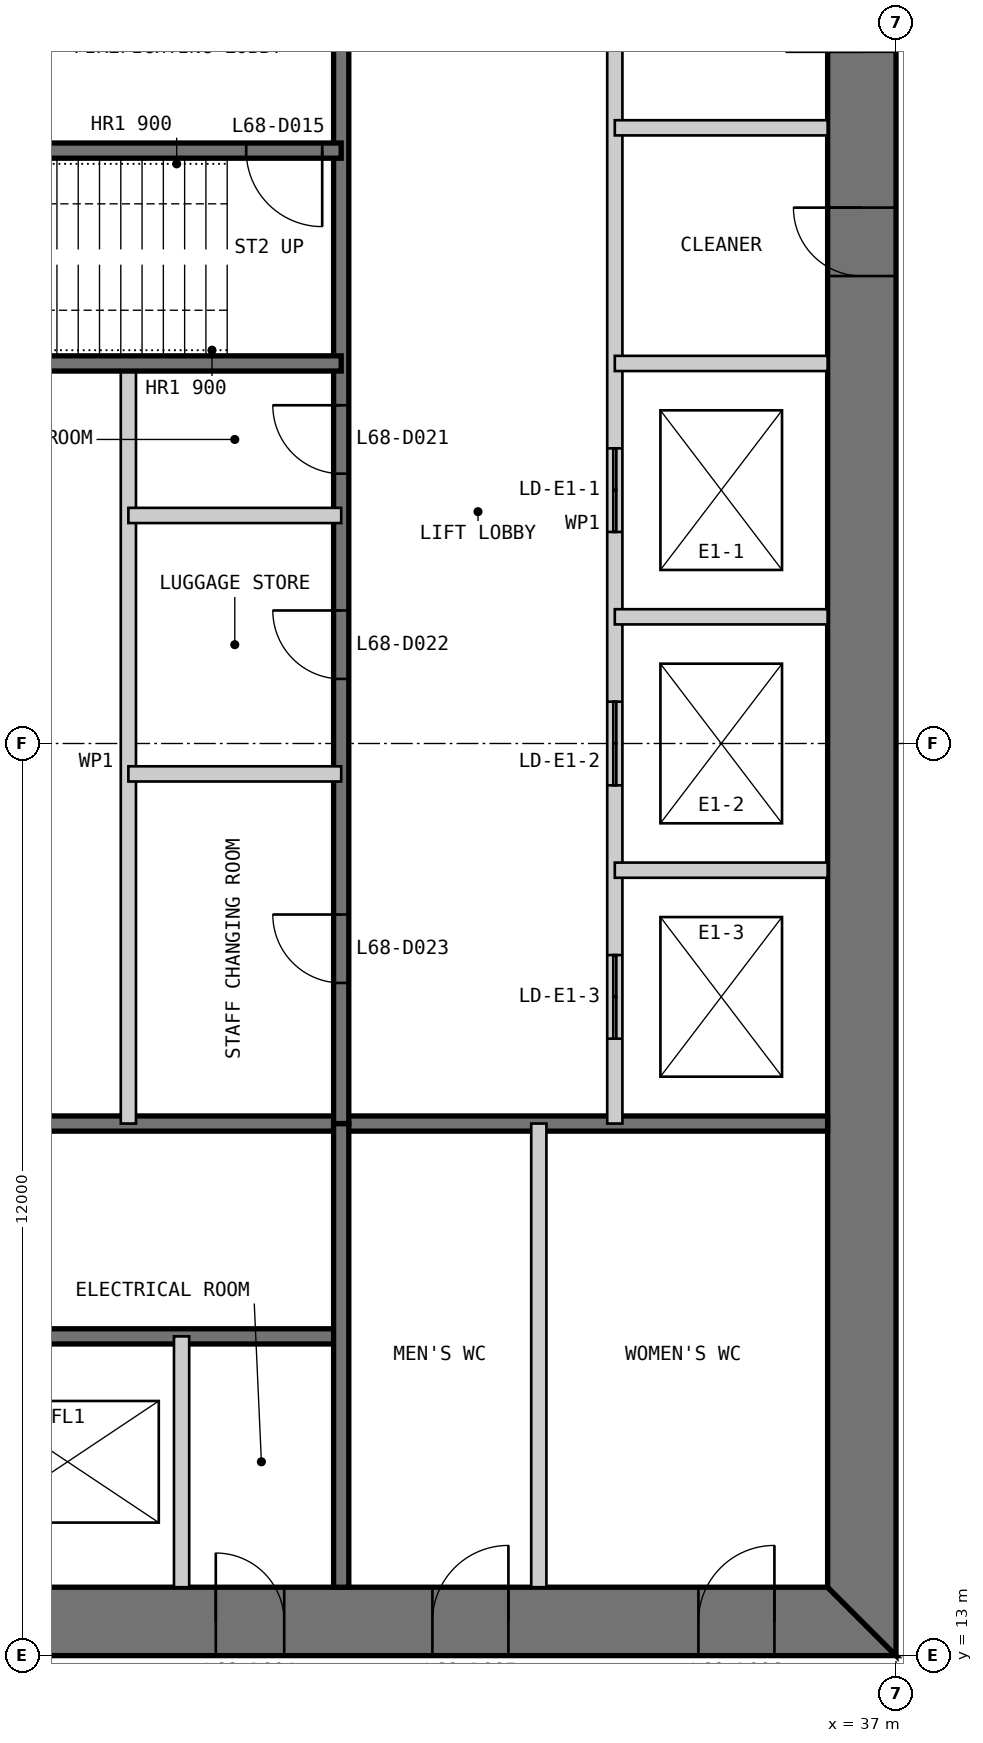
"""IFC4 building model, lengths in metres.
Left out: names, types, materials, properties, quantities, classifications, styles, units other than length and angle.
Written with IfcOpenShell. Run it as: python <this file> out.ifc"""

import sys

from ifc_helpers import new_model, si_unit, direction, frame, frame_2d, origin, place, context, subcontext, project, spatial, polyline, rectangle, outline, extrude, element, fill, save


model = new_model("IFC4")
c1 = context("Model", 3, precision=1e-05, world=origin(), true_north=direction((0.0, 1.0)))
c2 = subcontext(c1, "Body", "Model", "MODEL_VIEW")
j1 = project(units=[si_unit("LENGTHUNIT", "METRE"), si_unit("PLANEANGLEUNIT", "RADIAN")], contexts=[c1])
p1 = place(None, origin())
s1 = spatial("IfcSite", under=j1, at=p1, CompositionType="ELEMENT")
p2 = place(p1, origin())
s2 = spatial("IfcBuilding", under=s1, at=p2, CompositionType="ELEMENT")
p3 = place(p2, frame((0.0, 0.0, 283.2)))
s3 = spatial("IfcBuildingStorey", under=s2, at=p3, CompositionType="ELEMENT", Elevation=283.2)
p4 = place(p3, frame((13.0, 13.45, 0.0), z_axis=(0.0, 0.0, 1.0), x_axis=(1.0, 0.0, 0.0)))
e1 = element("IfcWall", 1, at=p4, inside=s3, PredefinedType="SHEAR", context=c2, shape_type="SweptSolid", body=[
    extrude(outline(polyline([(0.0, -0.45), (24.0, -0.45), (23.1, 0.45), (0.9, 0.45), (0.0, -0.45)])), origin(), (0.0, 0.0, 1.0), 3.4),
])
p5 = place(p4, frame((4.9, 0.0, 0.0)))
e2 = element("IfcOpeningElement", 2, at=p5, cuts=e1, PredefinedType="OPENING", context=c2, shape_type="SweptSolid", body=[
    extrude(rectangle(XDim=1.0, YDim=2.2, at=frame_2d((0.5, 1.1))), frame((0.0, 0.46, 0.0), z_axis=(0.0, -1.0, 0.0), x_axis=(1.0, 0.0, 0.0)), (0.0, 0.0, 1.0), 0.92),
])
p6 = place(p4, frame((8.9, 0.0, 0.0)))
e3 = element("IfcOpeningElement", 3, at=p6, cuts=e1, PredefinedType="OPENING", context=c2, shape_type="SweptSolid", body=[
    extrude(rectangle(XDim=1.1, YDim=2.2, at=frame_2d((0.55, 1.1))), frame((0.0, 0.46, 0.0), z_axis=(0.0, -1.0, 0.0), x_axis=(1.0, 0.0, 0.0)), (0.0, 0.0, 1.0), 0.92),
])
p7 = place(p4, frame((15.05, 0.0, 0.0)))
e4 = element("IfcOpeningElement", 4, at=p7, cuts=e1, PredefinedType="OPENING", context=c2, shape_type="SweptSolid", body=[
    extrude(rectangle(XDim=0.9, YDim=2.2, at=frame_2d((0.45, 1.1))), frame((0.0, 0.46, 0.0), z_axis=(0.0, -1.0, 0.0), x_axis=(1.0, 0.0, 0.0)), (0.0, 0.0, 1.0), 0.92),
])
p8 = place(p4, frame((17.9, 0.0, 0.0)))
e5 = element("IfcOpeningElement", 5, at=p8, cuts=e1, PredefinedType="OPENING", context=c2, shape_type="SweptSolid", body=[
    extrude(rectangle(XDim=1.0, YDim=2.2, at=frame_2d((0.5, 1.1))), frame((0.0, 0.46, 0.0), z_axis=(0.0, -1.0, 0.0), x_axis=(1.0, 0.0, 0.0)), (0.0, 0.0, 1.0), 0.92),
])
p9 = place(p4, frame((21.4, 0.0, 0.0)))
e6 = element("IfcOpeningElement", 6, at=p9, cuts=e1, PredefinedType="OPENING", context=c2, shape_type="SweptSolid", body=[
    extrude(rectangle(XDim=1.0, YDim=2.2, at=frame_2d((0.5, 1.1))), frame((0.0, 0.46, 0.0), z_axis=(0.0, -1.0, 0.0), x_axis=(1.0, 0.0, 0.0)), (0.0, 0.0, 1.0), 0.92),
])
p10 = place(p3, frame((36.55, 13.9, 0.0), z_axis=(0.0, 0.0, 1.0), x_axis=(0.0, 1.0, 0.0)))
e7 = element("IfcWall", 7, at=p10, inside=s3, PredefinedType="SHEAR", context=c2, shape_type="SweptSolid", body=[
    extrude(outline(polyline([(-0.9, -0.45), (23.1, -0.45), (22.2, 0.45), (0.0, 0.45), (-0.9, -0.45)])), origin(), (0.0, 0.0, 1.0), 3.4),
])
p11 = place(p10, frame((20.2, 0.0, 0.0)))
e8 = element("IfcOpeningElement", 8, at=p11, cuts=e7, PredefinedType="OPENING", context=c2, shape_type="SweptSolid", body=[
    extrude(rectangle(XDim=1.0, YDim=2.2, at=frame_2d((0.5, 1.1))), frame((0.0, 0.46, 0.0), z_axis=(0.0, -1.0, 0.0), x_axis=(1.0, 0.0, 0.0)), (0.0, 0.0, 1.0), 0.92),
])
p12 = place(p10, frame((17.25, 0.0, 0.0)))
e9 = element("IfcOpeningElement", 9, at=p12, cuts=e7, PredefinedType="OPENING", context=c2, shape_type="SweptSolid", body=[
    extrude(rectangle(XDim=0.9, YDim=2.2, at=frame_2d((0.45, 1.1))), frame((0.0, 0.46, 0.0), z_axis=(0.0, -1.0, 0.0), x_axis=(1.0, 0.0, 0.0)), (0.0, 0.0, 1.0), 0.92),
])
p13 = place(p3, frame((20.3, 17.2, 0.0), z_axis=(0.0, 0.0, 1.0), x_axis=(1.0, 0.0, 0.0)))
e10 = element("IfcWall", 10, at=p13, inside=s3, PredefinedType="SOLIDWALL", context=c2, shape_type="SweptSolid", body=[
    extrude(rectangle(XDim=9.4, YDim=0.2, at=frame_2d((4.7, 0.0))), origin(), (0.0, 0.0, 1.0), 3.2),
])
p14 = place(p13, frame((0.25, 0.0, 0.0)))
e11 = element("IfcOpeningElement", 11, at=p14, cuts=e10, PredefinedType="OPENING", context=c2, shape_type="SweptSolid", body=[
    extrude(rectangle(XDim=1.0, YDim=2.2, at=frame_2d((0.5, 1.1))), frame((0.0, 0.11, 0.0), z_axis=(0.0, -1.0, 0.0), x_axis=(1.0, 0.0, 0.0)), (0.0, 0.0, 1.0), 0.22),
])
p15 = place(p3, frame((20.3, 20.0, 0.0), z_axis=(0.0, 0.0, 1.0), x_axis=(1.0, 0.0, 0.0)))
e12 = element("IfcWall", 12, at=p15, inside=s3, PredefinedType="SOLIDWALL", context=c2, shape_type="SweptSolid", body=[
    extrude(rectangle(XDim=15.8, YDim=0.2, at=frame_2d((7.9, 0.0))), origin(), (0.0, 0.0, 1.0), 3.2),
])
p16 = place(p3, frame((27.6, 13.9, 0.0), z_axis=(0.0, 0.0, 1.0), x_axis=(0.0, 1.0, 0.0)))
e13 = element("IfcWall", 13, at=p16, inside=s3, PredefinedType="PARTITIONING", context=c2, shape_type="SweptSolid", body=[
    extrude(rectangle(XDim=3.3, YDim=0.2, at=frame_2d((1.65, 0.0))), origin(), (0.0, 0.0, 1.0), 3.2),
])
p17 = place(p3, frame((29.7, 13.9, 0.0), z_axis=(0.0, 0.0, 1.0), x_axis=(0.0, 1.0, 0.0)))
e14 = element("IfcWall", 14, at=p17, inside=s3, PredefinedType="SOLIDWALL", context=c2, shape_type="SweptSolid", body=[
    extrude(rectangle(XDim=6.1, YDim=0.2, at=frame_2d((3.05, 0.0))), origin(), (0.0, 0.0, 1.0), 3.2),
])
p18 = place(p3, frame((32.3, 13.9, 0.0), z_axis=(0.0, 0.0, 1.0), x_axis=(0.0, 1.0, 0.0)))
e15 = element("IfcWall", 15, at=p18, inside=s3, PredefinedType="PARTITIONING", context=c2, shape_type="SweptSolid", body=[
    extrude(rectangle(XDim=6.1, YDim=0.2, at=frame_2d((3.05, 0.0))), origin(), (0.0, 0.0, 1.0), 3.2),
])
p19 = place(p3, frame((33.3, 36.1, 0.0), z_axis=(0.0, 0.0, 1.0), x_axis=(0.0, -1.0, 0.0)))
e16 = element("IfcWall", 16, at=p19, inside=s3, PredefinedType="PARTITIONING", context=c2, shape_type="SweptSolid", body=[
    extrude(rectangle(XDim=16.1, YDim=0.2, at=frame_2d((8.05, 0.0))), origin(), (0.0, 0.0, 1.0), 3.2),
])
p20 = place(p19, frame((7.217, 0.0, 0.0)))
e17 = element("IfcOpeningElement", 17, at=p20, cuts=e16, PredefinedType="OPENING", context=c2, shape_type="SweptSolid", body=[
    extrude(rectangle(XDim=1.1, YDim=2.2, at=frame_2d((0.55, 1.1))), frame((0.0, 0.11, 0.0), z_axis=(0.0, -1.0, 0.0), x_axis=(1.0, 0.0, 0.0)), (0.0, 0.0, 1.0), 0.22),
])
p21 = place(p19, frame((10.55, 0.0, 0.0)))
e18 = element("IfcOpeningElement", 18, at=p21, cuts=e16, PredefinedType="OPENING", context=c2, shape_type="SweptSolid", body=[
    extrude(rectangle(XDim=1.1, YDim=2.2, at=frame_2d((0.55, 1.1))), frame((0.0, 0.11, 0.0), z_axis=(0.0, -1.0, 0.0), x_axis=(1.0, 0.0, 0.0)), (0.0, 0.0, 1.0), 0.22),
])
p22 = place(p19, frame((13.883, 0.0, 0.0)))
e19 = element("IfcOpeningElement", 19, at=p22, cuts=e16, PredefinedType="OPENING", context=c2, shape_type="SweptSolid", body=[
    extrude(rectangle(XDim=1.1, YDim=2.2, at=frame_2d((0.55, 1.1))), frame((0.0, 0.11, 0.0), z_axis=(0.0, -1.0, 0.0), x_axis=(1.0, 0.0, 0.0)), (0.0, 0.0, 1.0), 0.22),
])
p23 = place(p3, frame((29.7, 36.1, 0.0), z_axis=(0.0, 0.0, 1.0), x_axis=(0.0, -1.0, 0.0)))
e20 = element("IfcWall", 20, at=p23, inside=s3, PredefinedType="SOLIDWALL", context=c2, shape_type="SweptSolid", body=[
    extrude(rectangle(XDim=16.1, YDim=0.2, at=frame_2d((8.05, 0.0))), origin(), (0.0, 0.0, 1.0), 3.2),
])
p24 = place(p23, frame((6.65, 0.0, 0.0)))
e21 = element("IfcOpeningElement", 21, at=p24, cuts=e20, PredefinedType="OPENING", context=c2, shape_type="SweptSolid", body=[
    extrude(rectangle(XDim=0.9, YDim=2.2, at=frame_2d((0.45, 1.1))), frame((0.0, 0.11, 0.0), z_axis=(0.0, -1.0, 0.0), x_axis=(1.0, 0.0, 0.0)), (0.0, 0.0, 1.0), 0.22),
])
p25 = place(p23, frame((9.35, 0.0, 0.0)))
e22 = element("IfcOpeningElement", 22, at=p25, cuts=e20, PredefinedType="OPENING", context=c2, shape_type="SweptSolid", body=[
    extrude(rectangle(XDim=0.9, YDim=2.2, at=frame_2d((0.45, 1.1))), frame((0.0, 0.11, 0.0), z_axis=(0.0, -1.0, 0.0), x_axis=(1.0, 0.0, 0.0)), (0.0, 0.0, 1.0), 0.22),
])
p26 = place(p23, frame((13.35, 0.0, 0.0)))
e23 = element("IfcOpeningElement", 23, at=p26, cuts=e20, PredefinedType="OPENING", context=c2, shape_type="SweptSolid", body=[
    extrude(rectangle(XDim=0.9, YDim=2.2, at=frame_2d((0.45, 1.1))), frame((0.0, 0.11, 0.0), z_axis=(0.0, -1.0, 0.0), x_axis=(1.0, 0.0, 0.0)), (0.0, 0.0, 1.0), 0.22),
])
for number, where, z_axis, x_axis in (
    (24, (36.1, 30.0, 0.0), (0.0, 0.0, 1.0), (-1.0, 0.0, 0.0)),
    (25, (36.1, 26.667, 0.0), (0.0, 0.0, 1.0), (-1.0, 0.0, 0.0)),
    (26, (36.1, 23.333, 0.0), (0.0, 0.0, 1.0), (-1.0, 0.0, 0.0)),
):
    element("IfcWall", number, at=place(p3, frame(where, z_axis=z_axis, x_axis=x_axis)), inside=s3, PredefinedType="PARTITIONING", context=c2, shape_type="SweptSolid", body=[
        extrude(rectangle(XDim=2.8, YDim=0.2, at=frame_2d((1.4, 0.0))), origin(), (0.0, 0.0, 1.0), 3.2),
    ])
p27 = place(p3, frame((26.9, 30.0, 0.0), z_axis=(0.0, 0.0, 1.0), x_axis=(0.0, -1.0, 0.0)))
e27 = element("IfcWall", 27, at=p27, inside=s3, PredefinedType="PARTITIONING", context=c2, shape_type="SweptSolid", body=[
    extrude(rectangle(XDim=10.0, YDim=0.2, at=frame_2d((5.0, 0.0))), origin(), (0.0, 0.0, 1.0), 3.2),
])
p28 = place(p3, frame((29.7, 32.8, 0.0), z_axis=(0.0, 0.0, 1.0), x_axis=(-1.0, 0.0, 0.0)))
e28 = element("IfcWall", 28, at=p28, inside=s3, PredefinedType="SOLIDWALL", context=c2, shape_type="SweptSolid", body=[
    extrude(rectangle(XDim=9.4, YDim=0.2, at=frame_2d((4.7, 0.0))), origin(), (0.0, 0.0, 1.0), 3.2),
])
p29 = place(p28, frame((0.25, 0.0, 0.0)))
e29 = element("IfcOpeningElement", 29, at=p29, cuts=e28, PredefinedType="OPENING", context=c2, shape_type="SweptSolid", body=[
    extrude(rectangle(XDim=1.0, YDim=2.2, at=frame_2d((0.5, 1.1))), frame((0.0, 0.11, 0.0), z_axis=(0.0, -1.0, 0.0), x_axis=(1.0, 0.0, 0.0)), (0.0, 0.0, 1.0), 0.22),
])
p30 = place(p3, frame((29.7, 30.0, 0.0), z_axis=(0.0, 0.0, 1.0), x_axis=(-1.0, 0.0, 0.0)))
e30 = element("IfcWall", 30, at=p30, inside=s3, PredefinedType="SOLIDWALL", context=c2, shape_type="SweptSolid", body=[
    extrude(rectangle(XDim=15.8, YDim=0.2, at=frame_2d((7.9, 0.0))), origin(), (0.0, 0.0, 1.0), 3.2),
])
for number, where, z_axis, x_axis in (
    (31, (36.1, 33.1, 0.0), (0.0, 0.0, 1.0), (-1.0, 0.0, 0.0)),
    (32, (29.7, 28.0, 0.0), (0.0, 0.0, 1.0), (-1.0, 0.0, 0.0)),
    (33, (29.7, 24.6, 0.0), (0.0, 0.0, 1.0), (-1.0, 0.0, 0.0)),
):
    element("IfcWall", number, at=place(p3, frame(where, z_axis=z_axis, x_axis=x_axis)), inside=s3, PredefinedType="PARTITIONING", context=c2, shape_type="SweptSolid", body=[
        extrude(rectangle(XDim=2.8, YDim=0.2, at=frame_2d((1.4, 0.0))), origin(), (0.0, 0.0, 1.0), 3.2),
    ])
p31 = place(p7, origin())
e34 = element("IfcDoor", 34, at=p31, inside=s3, OperationType="SINGLE_SWING_LEFT", PredefinedType="DOOR", context=c2, shape_type="SweptSolid", body=[
    extrude(rectangle(XDim=0.9, YDim=2.2, at=frame_2d((0.45, 1.1))), frame((0.0, 0.025, 0.0), z_axis=(0.0, -1.0, 0.0), x_axis=(1.0, 0.0, 0.0)), (0.0, 0.0, 1.0), 0.05),
    extrude(outline(polyline([(0.0, 0.0), (0.04, 0.0), (0.04, 2.16), (0.86, 2.16), (0.86, 0.0), (0.9, 0.0), (0.9, 2.2), (0.0, 2.2), (0.0, 0.0)])), frame((0.0, 0.3, 0.0), z_axis=(0.0, -1.0, 0.0), x_axis=(1.0, 0.0, 0.0)), (0.0, 0.0, 1.0), 0.6),
])
fill(e4, e34)
p32 = place(p8, origin())
e35 = element("IfcDoor", 35, at=p32, inside=s3, OperationType="SINGLE_SWING_RIGHT", PredefinedType="DOOR", context=c2, shape_type="SweptSolid", body=[
    extrude(rectangle(XDim=1.0, YDim=2.2, at=frame_2d((0.5, 1.1))), frame((0.0, 0.025, 0.0), z_axis=(0.0, -1.0, 0.0), x_axis=(1.0, 0.0, 0.0)), (0.0, 0.0, 1.0), 0.05),
    extrude(outline(polyline([(0.0, 0.0), (0.04, 0.0), (0.04, 2.16), (0.96, 2.16), (0.96, 0.0), (1.0, 0.0), (1.0, 2.2), (0.0, 2.2), (0.0, 0.0)])), frame((0.0, 0.3, 0.0), z_axis=(0.0, -1.0, 0.0), x_axis=(1.0, 0.0, 0.0)), (0.0, 0.0, 1.0), 0.6),
])
fill(e5, e35)
p33 = place(p9, origin())
e36 = element("IfcDoor", 36, at=p33, inside=s3, OperationType="SINGLE_SWING_RIGHT", PredefinedType="DOOR", context=c2, shape_type="SweptSolid", body=[
    extrude(rectangle(XDim=1.0, YDim=2.2, at=frame_2d((0.5, 1.1))), frame((0.0, 0.025, 0.0), z_axis=(0.0, -1.0, 0.0), x_axis=(1.0, 0.0, 0.0)), (0.0, 0.0, 1.0), 0.05),
    extrude(outline(polyline([(0.0, 0.0), (0.04, 0.0), (0.04, 2.16), (0.96, 2.16), (0.96, 0.0), (1.0, 0.0), (1.0, 2.2), (0.0, 2.2), (0.0, 0.0)])), frame((0.0, 0.3, 0.0), z_axis=(0.0, -1.0, 0.0), x_axis=(1.0, 0.0, 0.0)), (0.0, 0.0, 1.0), 0.6),
])
fill(e6, e36)
p34 = place(p29, origin())
e37 = element("IfcDoor", 37, at=p34, inside=s3, OperationType="SINGLE_SWING_LEFT", PredefinedType="DOOR", context=c2, shape_type="SweptSolid", body=[
    extrude(rectangle(XDim=1.0, YDim=2.2, at=frame_2d((0.5, 1.1))), frame((0.0, 0.025, 0.0), z_axis=(0.0, -1.0, 0.0), x_axis=(1.0, 0.0, 0.0)), (0.0, 0.0, 1.0), 0.05),
])
fill(e29, e37)
p35 = place(p11, origin())
e38 = element("IfcDoor", 38, at=p35, inside=s3, OperationType="SINGLE_SWING_LEFT", PredefinedType="DOOR", context=c2, shape_type="SweptSolid", body=[
    extrude(rectangle(XDim=1.0, YDim=2.2, at=frame_2d((0.5, 1.1))), frame((0.0, 0.025, 0.0), z_axis=(0.0, -1.0, 0.0), x_axis=(1.0, 0.0, 0.0)), (0.0, 0.0, 1.0), 0.05),
    extrude(outline(polyline([(0.0, 0.0), (0.04, 0.0), (0.04, 2.16), (0.96, 2.16), (0.96, 0.0), (1.0, 0.0), (1.0, 2.2), (0.0, 2.2), (0.0, 0.0)])), frame((0.0, 0.3, 0.0), z_axis=(0.0, -1.0, 0.0), x_axis=(1.0, 0.0, 0.0)), (0.0, 0.0, 1.0), 0.6),
])
fill(e8, e38)
p36 = place(p12, origin())
e39 = element("IfcDoor", 39, at=p36, inside=s3, OperationType="SINGLE_SWING_RIGHT", PredefinedType="DOOR", context=c2, shape_type="SweptSolid", body=[
    extrude(rectangle(XDim=0.9, YDim=2.2, at=frame_2d((0.45, 1.1))), frame((0.0, 0.025, 0.0), z_axis=(0.0, -1.0, 0.0), x_axis=(1.0, 0.0, 0.0)), (0.0, 0.0, 1.0), 0.05),
    extrude(outline(polyline([(0.0, 0.0), (0.04, 0.0), (0.04, 2.16), (0.86, 2.16), (0.86, 0.0), (0.9, 0.0), (0.9, 2.2), (0.0, 2.2), (0.0, 0.0)])), frame((0.0, 0.3, 0.0), z_axis=(0.0, -1.0, 0.0), x_axis=(1.0, 0.0, 0.0)), (0.0, 0.0, 1.0), 0.6),
])
fill(e9, e39)
p37 = place(p24, frame((0.9, 0.0, 0.0), z_axis=(0.0, 0.0, 1.0), x_axis=(-1.0, 0.0, 0.0)))
e40 = element("IfcDoor", 40, at=p37, inside=s3, OperationType="SINGLE_SWING_RIGHT", PredefinedType="DOOR", context=c2, shape_type="SweptSolid", body=[
    extrude(rectangle(XDim=0.9, YDim=2.2, at=frame_2d((0.45, 1.1))), frame((0.0, 0.025, 0.0), z_axis=(0.0, -1.0, 0.0), x_axis=(1.0, 0.0, 0.0)), (0.0, 0.0, 1.0), 0.05),
])
fill(e21, e40)
p38 = place(p25, frame((0.9, 0.0, 0.0), z_axis=(0.0, 0.0, 1.0), x_axis=(-1.0, 0.0, 0.0)))
e41 = element("IfcDoor", 41, at=p38, inside=s3, OperationType="SINGLE_SWING_RIGHT", PredefinedType="DOOR", context=c2, shape_type="SweptSolid", body=[
    extrude(rectangle(XDim=0.9, YDim=2.2, at=frame_2d((0.45, 1.1))), frame((0.0, 0.025, 0.0), z_axis=(0.0, -1.0, 0.0), x_axis=(1.0, 0.0, 0.0)), (0.0, 0.0, 1.0), 0.05),
])
fill(e22, e41)
p39 = place(p26, frame((0.9, 0.0, 0.0), z_axis=(0.0, 0.0, 1.0), x_axis=(-1.0, 0.0, 0.0)))
e42 = element("IfcDoor", 42, at=p39, inside=s3, OperationType="SINGLE_SWING_RIGHT", PredefinedType="DOOR", context=c2, shape_type="SweptSolid", body=[
    extrude(rectangle(XDim=0.9, YDim=2.2, at=frame_2d((0.45, 1.1))), frame((0.0, 0.025, 0.0), z_axis=(0.0, -1.0, 0.0), x_axis=(1.0, 0.0, 0.0)), (0.0, 0.0, 1.0), 0.05),
])
fill(e23, e42)
p40 = place(p20, origin())
e43 = element("IfcDoor", 43, at=p40, inside=s3, OperationType="DOUBLE_DOOR_SLIDING", PredefinedType="DOOR", context=c2, shape_type="SweptSolid", body=[
    extrude(rectangle(XDim=1.1, YDim=2.2, at=frame_2d((0.55, 1.1))), frame((0.0, 0.025, 0.0), z_axis=(0.0, -1.0, 0.0), x_axis=(1.0, 0.0, 0.0)), (0.0, 0.0, 1.0), 0.05),
])
fill(e17, e43)
p41 = place(p21, origin())
e44 = element("IfcDoor", 44, at=p41, inside=s3, OperationType="DOUBLE_DOOR_SLIDING", PredefinedType="DOOR", context=c2, shape_type="SweptSolid", body=[
    extrude(rectangle(XDim=1.1, YDim=2.2, at=frame_2d((0.55, 1.1))), frame((0.0, 0.025, 0.0), z_axis=(0.0, -1.0, 0.0), x_axis=(1.0, 0.0, 0.0)), (0.0, 0.0, 1.0), 0.05),
])
fill(e18, e44)
p42 = place(p22, origin())
e45 = element("IfcDoor", 45, at=p42, inside=s3, OperationType="DOUBLE_DOOR_SLIDING", PredefinedType="DOOR", context=c2, shape_type="SweptSolid", body=[
    extrude(rectangle(XDim=1.1, YDim=2.2, at=frame_2d((0.55, 1.1))), frame((0.0, 0.025, 0.0), z_axis=(0.0, -1.0, 0.0), x_axis=(1.0, 0.0, 0.0)), (0.0, 0.0, 1.0), 0.05),
])
fill(e19, e45)
save(model, sys.argv[1])
